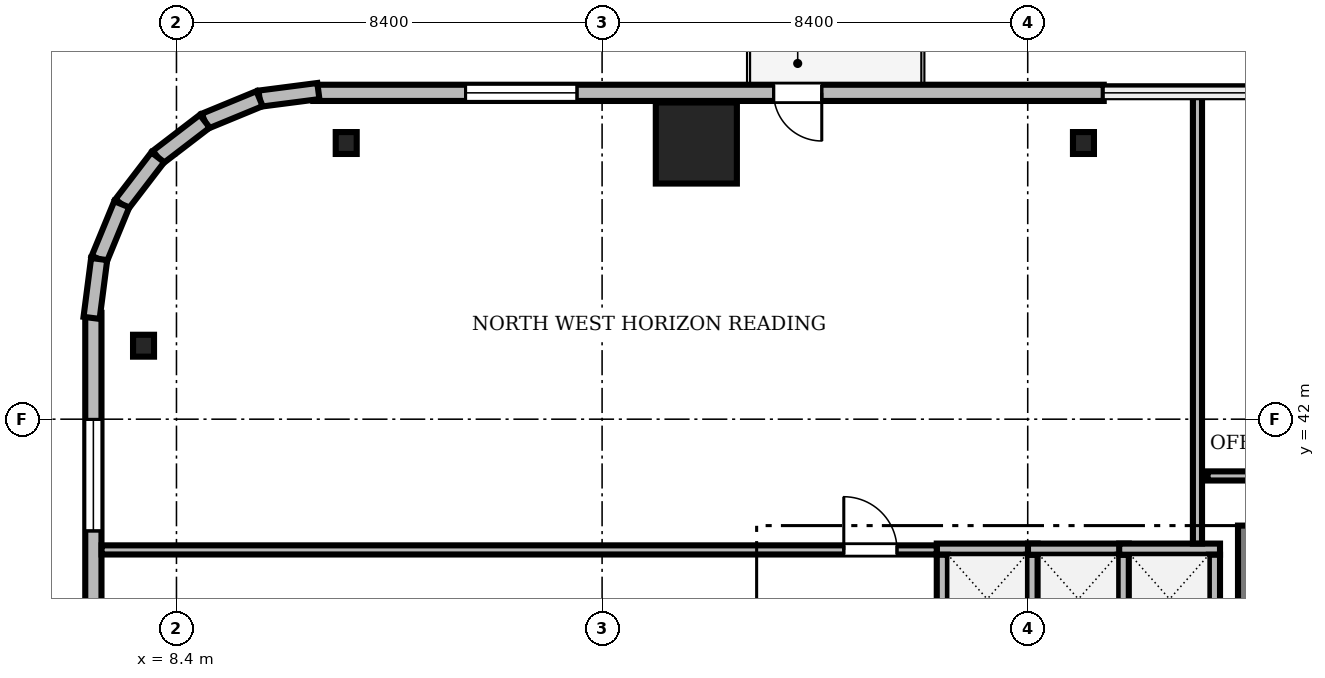
"""IFC4 building model, lengths in metres.
Left out: names, types, materials, properties, quantities, classifications, styles, units other than length and angle.
Written with IfcOpenShell. Run it as: python <this file> out.ifc"""

import sys

from ifc_helpers import new_model, si_unit, direction, frame, frame_2d, origin, origin_2d, place, context, subcontext, project, spatial, rectangle, i_section, extrude, source, transform, mapped, element, fill, save


model = new_model("IFC4")
c1 = context("Model", 3, precision=1e-05, world=origin(), true_north=direction((0.0, 1.0)))
c2 = subcontext(c1, "Body", "Model", "MODEL_VIEW")
j1 = project(units=[si_unit("LENGTHUNIT", "METRE"), si_unit("PLANEANGLEUNIT", "RADIAN")], contexts=[c1])
p1 = place(None, origin())
s1 = spatial("IfcSite", under=j1, at=p1, CompositionType="ELEMENT")
p2 = place(p1, origin())
s2 = spatial("IfcBuilding", under=s1, at=p2, CompositionType="ELEMENT")
p3 = place(p2, frame((0.0, 0.0, 98.7)))
s3 = spatial("IfcBuildingStorey", under=s2, at=p3, CompositionType="ELEMENT", Elevation=98.7)
m1 = source(origin(), c2, "Body", "SweptSolid", [
    extrude(rectangle(XDim=1.6, YDim=1.6, at=origin_2d()), origin(), (0.0, 0.0, 1.0), 4.76),
])
p4 = place(p3, frame((18.66, 47.45, 0.0), z_axis=(0.0, 0.0, 1.0), x_axis=(1.0, 0.0, 0.0)))
e1 = element("IfcColumn", 1, at=p4, inside=s3, PredefinedType="COLUMN", context=c2, shape_type="MappedRepresentation", body=[
    mapped(m1, transform((0.0, 0.0, 0.0), scale=1.0)),
])
m2 = source(origin(), c2, "Body", "SweptSolid", [
    extrude(i_section(OverallWidth=0.414, OverallDepth=0.432, WebThickness=0.026, FlangeThickness=0.04, FilletRadius=0.015, at=origin_2d()), origin(), (0.0, 0.0, 1.0), 4.76),
])
for number, where, z_axis, x_axis in (
    (2, (26.3, 47.45, 0.0), (0.0, 0.0, 1.0), (1.0, 0.0, 0.0)),
    (3, (11.75, 47.45, 0.0), (0.0, 0.0, 1.0), (1.0, 0.0, 0.0)),
    (4, (7.75, 43.45, 0.0), (0.0, 0.0, 1.0), (1.0, 0.0, 0.0)),
):
    element("IfcColumn", number, at=place(p3, frame(where, z_axis=z_axis, x_axis=x_axis)), inside=s3, PredefinedType="COLUMN", context=c2, shape_type="MappedRepresentation", body=[
        mapped(m2, transform((0.0, 0.0, 0.0), scale=1.0)),
    ])
m3 = source(origin(), c2, "Body", "SweptSolid", [
    extrude(rectangle(XDim=15.6, YDim=0.32, at=frame_2d((7.8, 0.0))), origin(), (0.0, 0.0, 1.0), 4.76),
])
p5 = place(p3, frame((26.7, 48.44, 0.0), z_axis=(0.0, 0.0, 1.0), x_axis=(-1.0, 0.0, 0.0)))
e5 = element("IfcWall", 5, at=p5, inside=s3, PredefinedType="SOLIDWALL", context=c2, shape_type="MappedRepresentation", body=[
    mapped(m3, transform((0.0, 0.0, 0.0), scale=1.0)),
])
m4 = source(origin(), c2, "Body", "SweptSolid", [
    extrude(rectangle(XDim=0.95, YDim=2.3, at=frame_2d((0.475, 1.15))), frame((0.0, 0.17, 0.0), z_axis=(0.0, -1.0, 0.0), x_axis=(1.0, 0.0, 0.0)), (0.0, 0.0, 1.0), 0.34),
])
p6 = place(p5, frame((5.565, 0.0, 0.0)))
e6 = element("IfcOpeningElement", 6, at=p6, cuts=e5, PredefinedType="OPENING", context=c2, shape_type="MappedRepresentation", body=[
    mapped(m4, transform((0.0, 0.0, 0.0), scale=1.0)),
])
m5 = source(origin(), c2, "Body", "SweptSolid", [
    extrude(rectangle(XDim=2.2, YDim=2.4, at=frame_2d((1.1, 1.2))), frame((0.0, 0.17, 0.0), z_axis=(0.0, -1.0, 0.0), x_axis=(1.0, 0.0, 0.0)), (0.0, 0.0, 1.0), 0.34),
])
p7 = place(p5, frame((10.395, 0.0, 0.72)))
e7 = element("IfcOpeningElement", 7, at=p7, cuts=e5, PredefinedType="OPENING", context=c2, shape_type="MappedRepresentation", body=[
    mapped(m5, transform((0.0, 0.0, 0.0), scale=1.0)),
])
m6 = source(origin(), c2, "Body", "SweptSolid", [
    extrude(rectangle(XDim=15.6, YDim=0.32, at=frame_2d((7.8, 0.0))), origin(), (0.0, 0.0, 1.0), 4.76),
])
p8 = place(p3, frame((6.76, 44.1, 0.0), z_axis=(0.0, 0.0, 1.0), x_axis=(0.0, -1.0, 0.0)))
e8 = element("IfcWall", 8, at=p8, inside=s3, PredefinedType="SOLIDWALL", context=c2, shape_type="MappedRepresentation", body=[
    mapped(m6, transform((0.0, 0.0, 0.0), scale=1.0)),
])
p9 = place(p8, frame((2.105, 0.0, 0.72)))
e9 = element("IfcOpeningElement", 9, at=p9, cuts=e8, PredefinedType="OPENING", context=c2, shape_type="MappedRepresentation", body=[
    mapped(m5, transform((0.0, 0.0, 0.0), scale=1.0)),
])
m7 = source(origin(), c2, "Body", "SweptSolid", [
    extrude(rectangle(XDim=1.17, YDim=0.32, at=frame_2d((0.585, 0.0))), origin(), (0.0, 0.0, 1.0), 4.76),
])
p10 = place(p3, frame((11.2, 48.476, 0.0), z_axis=(0.0, 0.0, 1.0), x_axis=(-0.991735963317, -0.128295670475, 0.0)))
e10 = element("IfcWall", 10, at=p10, inside=s3, PredefinedType="SOLIDWALL", context=c2, shape_type="MappedRepresentation", body=[
    mapped(m7, transform((0.0, 0.0, 0.0), scale=1.0)),
])
m8 = source(origin(), c2, "Body", "SweptSolid", [
    extrude(rectangle(XDim=1.169, YDim=0.32, at=frame_2d((0.584, 0.0))), origin(), (0.0, 0.0, 1.0), 4.76),
])
p11 = place(p3, frame((10.04, 48.325, 0.0), z_axis=(0.0, 0.0, 1.0), x_axis=(-0.924552646638, -0.381054331552, 0.0)))
e11 = element("IfcWall", 11, at=p11, inside=s3, PredefinedType="SOLIDWALL", context=c2, shape_type="MappedRepresentation", body=[
    mapped(m8, transform((0.0, 0.0, 0.0), scale=1.0)),
])
m9 = source(origin(), c2, "Body", "SweptSolid", [
    extrude(rectangle(XDim=1.169, YDim=0.32, at=frame_2d((0.584, 0.0))), origin(), (0.0, 0.0, 1.0), 4.76),
])
p12 = place(p3, frame((8.959, 47.88, 0.0), z_axis=(0.0, 0.0, 1.0), x_axis=(-0.793663520347, -0.608356981114, 0.0)))
e12 = element("IfcWall", 12, at=p12, inside=s3, PredefinedType="SOLIDWALL", context=c2, shape_type="MappedRepresentation", body=[
    mapped(m9, transform((0.0, 0.0, 0.0), scale=1.0)),
])
m10 = source(origin(), c2, "Body", "SweptSolid", [
    extrude(rectangle(XDim=1.169, YDim=0.32, at=frame_2d((0.584, 0.0))), origin(), (0.0, 0.0, 1.0), 4.76),
])
p13 = place(p3, frame((8.031, 47.169, 0.0), z_axis=(0.0, 0.0, 1.0), x_axis=(-0.608387696831, -0.793639975269, 0.0)))
e13 = element("IfcWall", 13, at=p13, inside=s3, PredefinedType="SOLIDWALL", context=c2, shape_type="MappedRepresentation", body=[
    mapped(m10, transform((0.0, 0.0, 0.0), scale=1.0)),
])
p14 = place(p3, frame((7.32, 46.241, 0.0), z_axis=(0.0, 0.0, 1.0), x_axis=(-0.381054331552, -0.924552646638, 0.0)))
e14 = element("IfcWall", 14, at=p14, inside=s3, PredefinedType="SOLIDWALL", context=c2, shape_type="MappedRepresentation", body=[
    mapped(m8, transform((0.0, 0.0, 0.0), scale=1.0)),
])
p15 = place(p3, frame((6.875, 45.16, 0.0), z_axis=(0.0, 0.0, 1.0), x_axis=(-0.128295670475, -0.991735963317, 0.0)))
e15 = element("IfcWall", 15, at=p15, inside=s3, PredefinedType="SOLIDWALL", context=c2, shape_type="MappedRepresentation", body=[
    mapped(m7, transform((0.0, 0.0, 0.0), scale=1.0)),
])
m11 = source(origin(), c2, "Body", "SweptSolid", [
    extrude(rectangle(XDim=9.25, YDim=0.25, at=frame_2d((4.625, 0.0))), origin(), (0.0, 0.0, 1.0), 4.8),
])
p16 = place(p3, frame((29.475, 30.65, 0.0), z_axis=(0.0, 0.0, 1.0), x_axis=(0.0, 1.0, 0.0)))
e16 = element("IfcWall", 16, at=p16, inside=s3, PredefinedType="SOLIDWALL", context=c2, shape_type="MappedRepresentation", body=[
    mapped(m11, transform((0.0, 0.0, 0.0), scale=1.0)),
])
m12 = source(origin(), c2, "Body", "SweptSolid", [
    extrude(rectangle(XDim=1.99, YDim=0.22, at=frame_2d((0.995, 0.0))), origin(), (0.0, 0.0, 1.0), 4.76),
])
p17 = place(p3, frame((23.405, 39.435, 0.0), z_axis=(0.0, 0.0, 1.0), x_axis=(1.0, 0.0, 0.0)))
e17 = element("IfcWall", 17, at=p17, inside=s3, PredefinedType="SOLIDWALL", context=c2, shape_type="MappedRepresentation", body=[
    mapped(m12, transform((0.0, 0.0, 0.0), scale=1.0)),
])
m13 = source(origin(), c2, "Body", "SweptSolid", [
    extrude(rectangle(XDim=1.75, YDim=0.22, at=frame_2d((0.875, 0.0))), origin(), (0.0, 0.0, 1.0), 4.76),
])
for number, where, z_axis, x_axis in (
    (18, (23.515, 37.575, 0.0), (0.0, 0.0, 1.0), (0.0, 1.0, 0.0)),
    (19, (25.285, 37.575, 0.0), (0.0, 0.0, 1.0), (0.0, 1.0, 0.0)),
):
    element("IfcWall", number, at=place(p3, frame(where, z_axis=z_axis, x_axis=x_axis)), inside=s3, PredefinedType="SOLIDWALL", context=c2, shape_type="MappedRepresentation", body=[
        mapped(m13, transform((0.0, 0.0, 0.0), scale=1.0)),
    ])
p18 = place(p3, frame((25.205, 39.435, 0.0), z_axis=(0.0, 0.0, 1.0), x_axis=(1.0, 0.0, 0.0)))
e20 = element("IfcWall", 20, at=p18, inside=s3, PredefinedType="SOLIDWALL", context=c2, shape_type="MappedRepresentation", body=[
    mapped(m12, transform((0.0, 0.0, 0.0), scale=1.0)),
])
p19 = place(p3, frame((27.085, 37.575, 0.0), z_axis=(0.0, 0.0, 1.0), x_axis=(0.0, 1.0, 0.0)))
e21 = element("IfcWall", 21, at=p19, inside=s3, PredefinedType="SOLIDWALL", context=c2, shape_type="MappedRepresentation", body=[
    mapped(m13, transform((0.0, 0.0, 0.0), scale=1.0)),
])
m14 = source(origin(), c2, "Body", "SweptSolid", [
    extrude(rectangle(XDim=1.99, YDim=0.22, at=frame_2d((0.995, 0.0))), origin(), (0.0, 0.0, 1.0), 4.76),
])
p20 = place(p3, frame((27.005, 39.435, 0.0), z_axis=(0.0, 0.0, 1.0), x_axis=(1.0, 0.0, 0.0)))
e22 = element("IfcWall", 22, at=p20, inside=s3, PredefinedType="SOLIDWALL", context=c2, shape_type="MappedRepresentation", body=[
    mapped(m14, transform((0.0, 0.0, 0.0), scale=1.0)),
])
p21 = place(p3, frame((28.885, 37.575, 0.0), z_axis=(0.0, 0.0, 1.0), x_axis=(0.0, 1.0, 0.0)))
e23 = element("IfcWall", 23, at=p21, inside=s3, PredefinedType="SOLIDWALL", context=c2, shape_type="MappedRepresentation", body=[
    mapped(m13, transform((0.0, 0.0, 0.0), scale=1.0)),
])
m15 = source(origin(), c2, "Body", "SweptSolid", [
    extrude(rectangle(XDim=24.3, YDim=0.18, at=frame_2d((12.15, 0.0))), origin(), (0.0, 0.0, 1.0), 4.002),
])
p22 = place(p3, frame((28.75, 40.88, 0.0), z_axis=(0.0, 0.0, 1.0), x_axis=(1.0, 0.0, 0.0)))
e24 = element("IfcWall", 24, at=p22, inside=s3, PredefinedType="PARTITIONING", context=c2, shape_type="MappedRepresentation", body=[
    mapped(m15, transform((0.0, 0.0, 0.0), scale=1.0)),
])
m16 = source(origin(), c2, "Body", "SweptSolid", [
    extrude(rectangle(XDim=1.05, YDim=2.2, at=frame_2d((0.525, 1.1))), frame((0.0, 0.1, 0.0), z_axis=(0.0, -1.0, 0.0), x_axis=(1.0, 0.0, 0.0)), (0.0, 0.0, 1.0), 0.2),
])
p23 = place(p22, frame((20.25, 0.0, 0.0)))
e25 = element("IfcOpeningElement", 25, at=p23, cuts=e24, PredefinedType="OPENING", context=c2, shape_type="MappedRepresentation", body=[
    mapped(m16, transform((0.0, 0.0, 0.0), scale=1.0)),
])
m17 = source(origin(), c2, "Body", "SweptSolid", [
    extrude(rectangle(XDim=16.483, YDim=0.18, at=frame_2d((8.241, 0.0))), origin(), (0.0, 0.0, 1.0), 4.002),
])
p24 = place(p3, frame((6.922, 39.42, 0.0), z_axis=(0.0, 0.0, 1.0), x_axis=(1.0, 0.0, 0.0)))
e26 = element("IfcWall", 26, at=p24, inside=s3, PredefinedType="PARTITIONING", context=c2, shape_type="MappedRepresentation", body=[
    mapped(m17, transform((0.0, 0.0, 0.0), scale=1.0)),
])
p25 = place(p24, frame((14.648, 0.0, 0.0)))
e27 = element("IfcOpeningElement", 27, at=p25, cuts=e26, PredefinedType="OPENING", context=c2, shape_type="MappedRepresentation", body=[
    mapped(m16, transform((0.0, 0.0, 0.0), scale=1.0)),
])
m18 = source(origin(), c2, "Body", "SweptSolid", [
    extrude(rectangle(XDim=8.933, YDim=0.18, at=frame_2d((4.466, 0.0))), origin(), (0.0, 0.0, 1.0), 4.002),
])
p26 = place(p3, frame((28.55, 39.547, 0.0), z_axis=(0.0, 0.0, 1.0), x_axis=(0.0, 1.0, 0.0)))
e28 = element("IfcWall", 28, at=p26, inside=s3, PredefinedType="PARTITIONING", context=c2, shape_type="MappedRepresentation", body=[
    mapped(m18, transform((0.0, 0.0, 0.0), scale=1.0)),
])
m19 = source(origin(), c2, "Body", "SweptSolid", [
    extrude(rectangle(XDim=0.95, YDim=2.3, at=frame_2d((0.475, 1.15))), frame((0.0, 0.025, 0.0), z_axis=(0.0, -1.0, 0.0), x_axis=(1.0, 0.0, 0.0)), (0.0, 0.0, 1.0), 0.05),
])
p27 = place(p6, frame((0.95, 0.0, 0.0), z_axis=(0.0, 0.0, 1.0), x_axis=(-1.0, 0.0, 0.0)))
e29 = element("IfcDoor", 29, at=p27, inside=s3, OperationType="NOTDEFINED", PredefinedType="DOOR", context=c2, shape_type="MappedRepresentation", body=[
    mapped(m19, transform((0.0, 0.0, 0.0), scale=1.0)),
])
fill(e6, e29)
m20 = source(origin(), c2, "Body", "SweptSolid", [
    extrude(rectangle(XDim=2.2, YDim=2.4, at=frame_2d((1.1, 1.2))), frame((0.0, 0.03, 0.0), z_axis=(0.0, -1.0, 0.0), x_axis=(1.0, 0.0, 0.0)), (0.0, 0.0, 1.0), 0.06),
])
p28 = place(p7, origin())
e30 = element("IfcWindow", 30, at=p28, inside=s3, PartitioningType="SINGLE_PANEL", PredefinedType="WINDOW", context=c2, shape_type="MappedRepresentation", body=[
    mapped(m20, transform((0.0, 0.0, 0.0), scale=1.0)),
])
fill(e7, e30)
p29 = place(p9, origin())
e31 = element("IfcWindow", 31, at=p29, inside=s3, PartitioningType="SINGLE_PANEL", PredefinedType="WINDOW", context=c2, shape_type="MappedRepresentation", body=[
    mapped(m20, transform((0.0, 0.0, 0.0), scale=1.0)),
])
fill(e9, e31)
m21 = source(origin(), c2, "Body", "SweptSolid", [
    extrude(rectangle(XDim=1.05, YDim=2.2, at=frame_2d((0.525, 1.1))), frame((0.0, 0.025, 0.0), z_axis=(0.0, -1.0, 0.0), x_axis=(1.0, 0.0, 0.0)), (0.0, 0.0, 1.0), 0.05),
])
p30 = place(p25, origin())
e32 = element("IfcDoor", 32, at=p30, inside=s3, OperationType="SINGLE_SWING_LEFT", PredefinedType="DOOR", context=c2, shape_type="MappedRepresentation", body=[
    mapped(m21, transform((0.0, 0.0, 0.0), scale=1.0)),
])
fill(e27, e32)
save(model, sys.argv[1])
